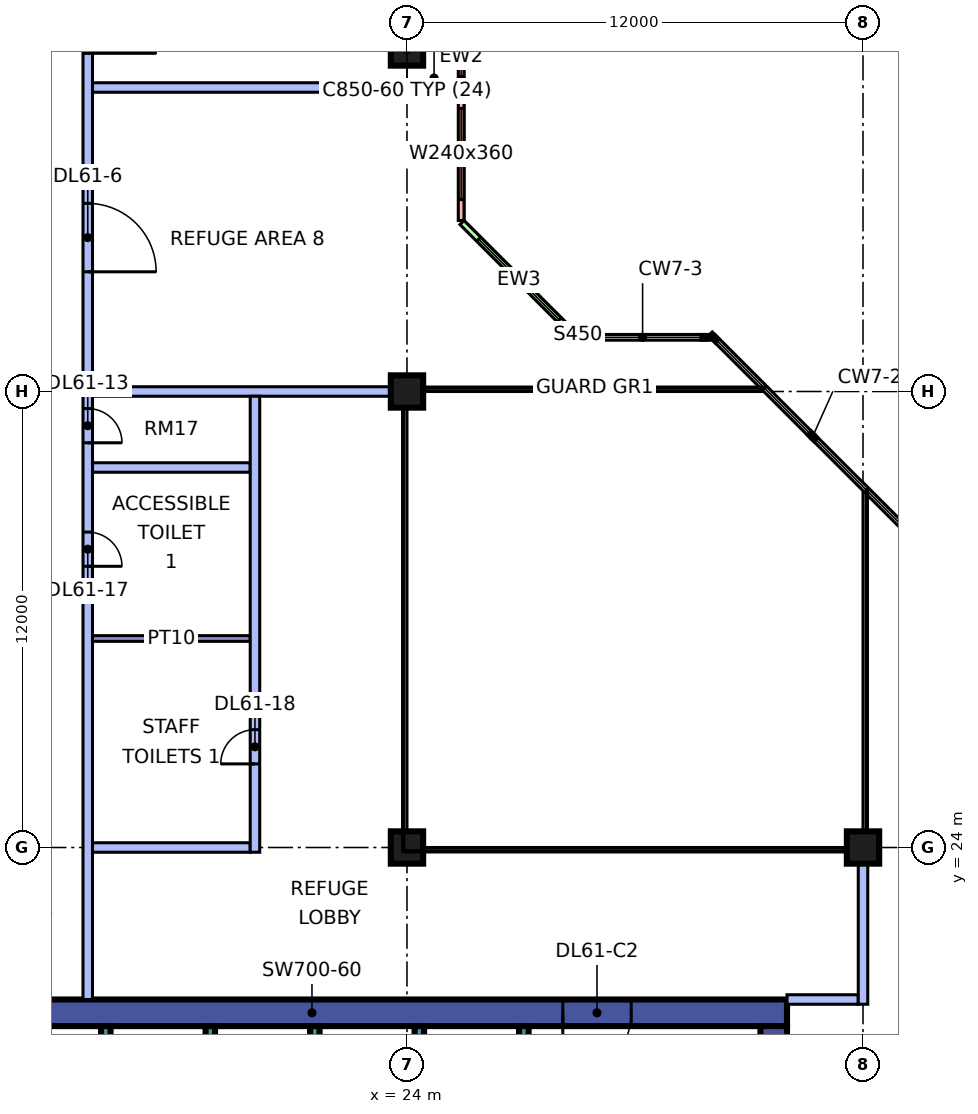
"""IFC4 building model, lengths in metres.
Left out: names, types, materials, properties, quantities, classifications, styles, units other than length and angle.
Written with IfcOpenShell. Run it as: python <this file> out.ifc"""

import sys

from ifc_helpers import new_model, si_unit, direction, frame, frame_2d, origin, origin_2d, place, context, subcontext, project, spatial, rectangle, extrude, element, fill, save


model = new_model("IFC4")
c1 = context("Model", 3, precision=1e-05, world=origin(), true_north=direction((0.0, 1.0)))
c2 = subcontext(c1, "Body", "Model", "MODEL_VIEW")
j1 = project(units=[si_unit("LENGTHUNIT", "METRE"), si_unit("PLANEANGLEUNIT", "RADIAN")], contexts=[c1])
p1 = place(None, origin())
s1 = spatial("IfcSite", under=j1, at=p1, CompositionType="ELEMENT")
p2 = place(p1, origin())
s2 = spatial("IfcBuilding", under=s1, at=p2, CompositionType="ELEMENT")
p3 = place(p2, frame((0.0, 0.0, 256.65)))
s3 = spatial("IfcBuildingStorey", under=s2, at=p3, CompositionType="ELEMENT", Elevation=256.65)
for number, where, z_axis, x_axis in (
    (1, (24.0, 24.0, 0.0), (0.0, 0.0, 1.0), (1.0, 0.0, 0.0)),
    (2, (24.0, 36.0, 0.0), (0.0, 0.0, 1.0), (1.0, 0.0, 0.0)),
    (3, (24.0, 45.0, 0.0), (0.0, 0.0, 1.0), (1.0, 0.0, 0.0)),
    (4, (36.0, 24.0, 0.0), (0.0, 0.0, 1.0), (1.0, 0.0, 0.0)),
):
    element("IfcColumn", number, at=place(p3, frame(where, z_axis=z_axis, x_axis=x_axis)), inside=s3, PredefinedType="COLUMN", context=c2, shape_type="SweptSolid", body=[
        extrude(rectangle(XDim=0.85, YDim=0.85, at=origin_2d()), origin(), (0.0, 0.0, 1.0), 5.5),
    ])
p4 = place(p3, frame((9.0, 19.65, 0.0), z_axis=(0.0, 0.0, 1.0), x_axis=(1.0, 0.0, 0.0)))
e5 = element("IfcWall", 5, at=p4, inside=s3, PredefinedType="SHEAR", context=c2, shape_type="SweptSolid", body=[
    extrude(rectangle(XDim=25.0, YDim=0.7, at=frame_2d((12.5, 0.0))), origin(), (0.0, 0.0, 1.0), 5.5),
])
p5 = place(p4, frame((19.1, 0.0, 0.0)))
e6 = element("IfcOpeningElement", 6, at=p5, cuts=e5, PredefinedType="OPENING", context=c2, shape_type="SweptSolid", body=[
    extrude(rectangle(XDim=1.8, YDim=2.4, at=frame_2d((0.9, 1.2))), frame((0.0, 0.36, 0.0), z_axis=(0.0, -1.0, 0.0), x_axis=(1.0, 0.0, 0.0)), (0.0, 0.0, 1.0), 0.72),
])
p6 = place(p3, frame((33.65, 7.7, 0.0), z_axis=(0.0, 0.0, 1.0), x_axis=(0.0, 1.0, 0.0)))
e7 = element("IfcWall", 7, at=p6, inside=s3, PredefinedType="SHEAR", context=c2, shape_type="SweptSolid", body=[
    extrude(rectangle(XDim=11.6, YDim=0.7, at=frame_2d((5.8, 0.0))), origin(), (0.0, 0.0, 1.0), 5.5),
])
p7 = place(p6, frame((5.5, 0.0, 0.0)))
e8 = element("IfcOpeningElement", 8, at=p7, cuts=e7, PredefinedType="OPENING", context=c2, shape_type="SweptSolid", body=[
    extrude(rectangle(XDim=1.8, YDim=2.4, at=frame_2d((0.9, 1.2))), frame((0.0, 0.36, 0.0), z_axis=(0.0, -1.0, 0.0), x_axis=(1.0, 0.0, 0.0)), (0.0, 0.0, 1.0), 0.72),
])
for number, where, z_axis, x_axis in (
    (9, (16.075, 15.8, 0.0), (0.0, 0.0, 1.0), (0.0, 1.0, 0.0)),
    (10, (18.825, 15.8, 0.0), (0.0, 0.0, 1.0), (0.0, 1.0, 0.0)),
    (11, (21.575, 15.8, 0.0), (0.0, 0.0, 1.0), (0.0, 1.0, 0.0)),
    (12, (24.325, 15.8, 0.0), (0.0, 0.0, 1.0), (0.0, 1.0, 0.0)),
    (13, (27.075, 15.8, 0.0), (0.0, 0.0, 1.0), (0.0, 1.0, 0.0)),
):
    element("IfcWall", number, at=place(p3, frame(where, z_axis=z_axis, x_axis=x_axis)), inside=s3, PredefinedType="SHEAR", context=c2, shape_type="SweptSolid", body=[
        extrude(rectangle(XDim=3.5, YDim=0.25, at=frame_2d((1.75, 0.0))), origin(), (0.0, 0.0, 1.0), 5.5),
    ])
p8 = place(p3, frame((28.447, 37.447, 0.0), z_axis=(0.0, 0.0, 1.0), x_axis=(-0.707106781187, 0.707106781187, 0.0)))
e14 = element("IfcWall", 14, at=p8, inside=s3, PredefinedType="SOLIDWALL", context=c2, shape_type="SweptSolid", body=[
    extrude(rectangle(XDim=4.243, YDim=0.15, at=frame_2d((2.121, 0.0))), origin(), (0.0, 0.0, 1.0), 5.05),
])
p9 = place(p8, frame((0.621, 0.0, 0.45)))
e15 = element("IfcOpeningElement", 15, at=p9, cuts=e14, PredefinedType="OPENING", context=c2, shape_type="SweptSolid", body=[
    extrude(rectangle(XDim=3.0, YDim=3.6, at=frame_2d((1.5, 1.8))), frame((0.0, 0.085, 0.0), z_axis=(0.0, -1.0, 0.0), x_axis=(1.0, 0.0, 0.0)), (0.0, 0.0, 1.0), 0.17),
])
p10 = place(p3, frame((25.425, 40.5, 0.0), z_axis=(0.0, 0.0, 1.0), x_axis=(0.0, 1.0, 0.0)))
e16 = element("IfcWall", 16, at=p10, inside=s3, PredefinedType="SOLIDWALL", context=c2, shape_type="SweptSolid", body=[
    extrude(rectangle(XDim=7.425, YDim=0.15, at=frame_2d((3.712, 0.0))), origin(), (0.0, 0.0, 1.0), 5.05),
])
p11 = place(p10, frame((0.55, 0.0, 0.45)))
e17 = element("IfcOpeningElement", 17, at=p11, cuts=e16, PredefinedType="OPENING", context=c2, shape_type="SweptSolid", body=[
    extrude(rectangle(XDim=2.4, YDim=3.6, at=frame_2d((1.2, 1.8))), frame((0.0, 0.085, 0.0), z_axis=(0.0, -1.0, 0.0), x_axis=(1.0, 0.0, 0.0)), (0.0, 0.0, 1.0), 0.17),
])
p12 = place(p3, frame((15.6, 20.0, 0.0), z_axis=(0.0, 0.0, 1.0), x_axis=(0.0, 1.0, 0.0)))
e18 = element("IfcWall", 18, at=p12, inside=s3, PredefinedType="PARTITIONING", context=c2, shape_type="SweptSolid", body=[
    extrude(rectangle(XDim=27.775, YDim=0.25, at=frame_2d((13.887, 0.0))), origin(), (0.0, 0.0, 1.0), 5.05),
])
p13 = place(p12, frame((19.15, 0.0, 0.0)))
e19 = element("IfcOpeningElement", 19, at=p13, cuts=e18, PredefinedType="OPENING", context=c2, shape_type="SweptSolid", body=[
    extrude(rectangle(XDim=1.8, YDim=2.1, at=frame_2d((0.9, 1.05))), frame((0.0, 0.135, 0.0), z_axis=(0.0, -1.0, 0.0), x_axis=(1.0, 0.0, 0.0)), (0.0, 0.0, 1.0), 0.27),
])
p14 = place(p12, frame((24.9, 0.0, 0.0)))
e20 = element("IfcOpeningElement", 20, at=p14, cuts=e18, PredefinedType="OPENING", context=c2, shape_type="SweptSolid", body=[
    extrude(rectangle(XDim=1.8, YDim=2.1, at=frame_2d((0.9, 1.05))), frame((0.0, 0.135, 0.0), z_axis=(0.0, -1.0, 0.0), x_axis=(1.0, 0.0, 0.0)), (0.0, 0.0, 1.0), 0.27),
])
p15 = place(p12, frame((14.65, 0.0, 0.0)))
e21 = element("IfcOpeningElement", 21, at=p15, cuts=e18, PredefinedType="OPENING", context=c2, shape_type="SweptSolid", body=[
    extrude(rectangle(XDim=0.9, YDim=2.1, at=frame_2d((0.45, 1.05))), frame((0.0, 0.135, 0.0), z_axis=(0.0, -1.0, 0.0), x_axis=(1.0, 0.0, 0.0)), (0.0, 0.0, 1.0), 0.27),
])
p16 = place(p12, frame((11.4, 0.0, 0.0)))
e22 = element("IfcOpeningElement", 22, at=p16, cuts=e18, PredefinedType="OPENING", context=c2, shape_type="SweptSolid", body=[
    extrude(rectangle(XDim=0.9, YDim=2.1, at=frame_2d((0.45, 1.05))), frame((0.0, 0.135, 0.0), z_axis=(0.0, -1.0, 0.0), x_axis=(1.0, 0.0, 0.0)), (0.0, 0.0, 1.0), 0.27),
])
p17 = place(p3, frame((15.725, 24.0, 0.0), z_axis=(0.0, 0.0, 1.0), x_axis=(1.0, 0.0, 0.0)))
e23 = element("IfcWall", 23, at=p17, inside=s3, PredefinedType="PARTITIONING", context=c2, shape_type="SweptSolid", body=[
    extrude(rectangle(XDim=4.15, YDim=0.25, at=frame_2d((2.075, 0.0))), origin(), (0.0, 0.0, 1.0), 5.05),
])
p18 = place(p3, frame((15.725, 29.5, 0.0), z_axis=(0.0, 0.0, 1.0), x_axis=(1.0, 0.0, 0.0)))
e24 = element("IfcWall", 24, at=p18, inside=s3, PredefinedType="PARTITIONING", context=c2, shape_type="SweptSolid", body=[
    extrude(rectangle(XDim=4.15, YDim=0.15, at=frame_2d((2.075, 0.0))), origin(), (0.0, 0.0, 1.0), 5.05),
])
p19 = place(p3, frame((15.725, 34.0, 0.0), z_axis=(0.0, 0.0, 1.0), x_axis=(1.0, 0.0, 0.0)))
e25 = element("IfcWall", 25, at=p19, inside=s3, PredefinedType="PARTITIONING", context=c2, shape_type="SweptSolid", body=[
    extrude(rectangle(XDim=4.15, YDim=0.25, at=frame_2d((2.075, 0.0))), origin(), (0.0, 0.0, 1.0), 5.05),
])
p20 = place(p3, frame((15.725, 36.0, 0.0), z_axis=(0.0, 0.0, 1.0), x_axis=(1.0, 0.0, 0.0)))
e26 = element("IfcWall", 26, at=p20, inside=s3, PredefinedType="PARTITIONING", context=c2, shape_type="SweptSolid", body=[
    extrude(rectangle(XDim=8.275, YDim=0.25, at=frame_2d((4.137, 0.0))), origin(), (0.0, 0.0, 1.0), 5.05),
])
p21 = place(p3, frame((15.725, 44.0, 0.0), z_axis=(0.0, 0.0, 1.0), x_axis=(1.0, 0.0, 0.0)))
e27 = element("IfcWall", 27, at=p21, inside=s3, PredefinedType="PARTITIONING", context=c2, shape_type="SweptSolid", body=[
    extrude(rectangle(XDim=9.625, YDim=0.25, at=frame_2d((4.812, 0.0))), origin(), (0.0, 0.0, 1.0), 5.05),
])
p22 = place(p3, frame((20.0, 23.875, 0.0), z_axis=(0.0, 0.0, 1.0), x_axis=(0.0, 1.0, 0.0)))
e28 = element("IfcWall", 28, at=p22, inside=s3, PredefinedType="PARTITIONING", context=c2, shape_type="SweptSolid", body=[
    extrude(rectangle(XDim=12.0, YDim=0.25, at=frame_2d((6.0, 0.0))), origin(), (0.0, 0.0, 1.0), 5.05),
])
p23 = place(p22, frame((2.325, 0.0, 0.0)))
e29 = element("IfcOpeningElement", 29, at=p23, cuts=e28, PredefinedType="OPENING", context=c2, shape_type="SweptSolid", body=[
    extrude(rectangle(XDim=0.9, YDim=2.1, at=frame_2d((0.45, 1.05))), frame((0.0, 0.135, 0.0), z_axis=(0.0, -1.0, 0.0), x_axis=(1.0, 0.0, 0.0)), (0.0, 0.0, 1.0), 0.27),
])
p24 = place(p3, frame((34.0, 20.0, 0.0), z_axis=(0.0, 0.0, 1.0), x_axis=(1.0, 0.0, 0.0)))
e30 = element("IfcWall", 30, at=p24, inside=s3, PredefinedType="PARTITIONING", context=c2, shape_type="SweptSolid", body=[
    extrude(rectangle(XDim=1.875, YDim=0.25, at=frame_2d((0.938, 0.0))), origin(), (0.0, 0.0, 1.0), 5.05),
])
p25 = place(p3, frame((36.0, 19.875, 0.0), z_axis=(0.0, 0.0, 1.0), x_axis=(0.0, 1.0, 0.0)))
e31 = element("IfcWall", 31, at=p25, inside=s3, PredefinedType="PARTITIONING", context=c2, shape_type="SweptSolid", body=[
    extrude(rectangle(XDim=4.125, YDim=0.25, at=frame_2d((2.062, 0.0))), origin(), (0.0, 0.0, 1.0), 5.05),
])
p26 = place(p9, origin())
e32 = element("IfcWindow", 32, at=p26, inside=s3, PartitioningType="SINGLE_PANEL", PredefinedType="WINDOW", context=c2, shape_type="SweptSolid", body=[
    extrude(rectangle(XDim=3.0, YDim=3.6, at=frame_2d((1.5, 1.8))), frame((0.0, 0.03, 0.0), z_axis=(0.0, -1.0, 0.0), x_axis=(1.0, 0.0, 0.0)), (0.0, 0.0, 1.0), 0.06),
])
fill(e15, e32)
p27 = place(p11, origin())
e33 = element("IfcWindow", 33, at=p27, inside=s3, PartitioningType="SINGLE_PANEL", PredefinedType="WINDOW", context=c2, shape_type="SweptSolid", body=[
    extrude(rectangle(XDim=2.4, YDim=3.6, at=frame_2d((1.2, 1.8))), frame((0.0, 0.03, 0.0), z_axis=(0.0, -1.0, 0.0), x_axis=(1.0, 0.0, 0.0)), (0.0, 0.0, 1.0), 0.06),
])
fill(e17, e33)
p28 = place(p5, frame((1.8, 0.0, 0.0), z_axis=(0.0, 0.0, 1.0), x_axis=(-1.0, 0.0, 0.0)))
e34 = element("IfcDoor", 34, at=p28, inside=s3, OperationType="DOUBLE_DOOR_SINGLE_SWING", PredefinedType="DOOR", context=c2, shape_type="SweptSolid", body=[
    extrude(rectangle(XDim=1.8, YDim=2.4, at=frame_2d((0.9, 1.2))), frame((0.0, 0.025, 0.0), z_axis=(0.0, -1.0, 0.0), x_axis=(1.0, 0.0, 0.0)), (0.0, 0.0, 1.0), 0.05),
])
fill(e6, e34)
p29 = place(p13, frame((1.8, 0.0, 0.0), z_axis=(0.0, 0.0, 1.0), x_axis=(-1.0, 0.0, 0.0)))
e35 = element("IfcDoor", 35, at=p29, inside=s3, OperationType="DOUBLE_DOOR_SINGLE_SWING", PredefinedType="DOOR", context=c2, shape_type="SweptSolid", body=[
    extrude(rectangle(XDim=1.8, YDim=2.1, at=frame_2d((0.9, 1.05))), frame((0.0, 0.025, 0.0), z_axis=(0.0, -1.0, 0.0), x_axis=(1.0, 0.0, 0.0)), (0.0, 0.0, 1.0), 0.05),
])
fill(e19, e35)
p30 = place(p14, frame((1.8, 0.0, 0.0), z_axis=(0.0, 0.0, 1.0), x_axis=(-1.0, 0.0, 0.0)))
e36 = element("IfcDoor", 36, at=p30, inside=s3, OperationType="DOUBLE_DOOR_SINGLE_SWING", PredefinedType="DOOR", context=c2, shape_type="SweptSolid", body=[
    extrude(rectangle(XDim=1.8, YDim=2.1, at=frame_2d((0.9, 1.05))), frame((0.0, 0.025, 0.0), z_axis=(0.0, -1.0, 0.0), x_axis=(1.0, 0.0, 0.0)), (0.0, 0.0, 1.0), 0.05),
])
fill(e20, e36)
p31 = place(p15, frame((0.9, 0.0, 0.0), z_axis=(0.0, 0.0, 1.0), x_axis=(-1.0, 0.0, 0.0)))
e37 = element("IfcDoor", 37, at=p31, inside=s3, OperationType="SINGLE_SWING_LEFT", PredefinedType="DOOR", context=c2, shape_type="SweptSolid", body=[
    extrude(rectangle(XDim=0.9, YDim=2.1, at=frame_2d((0.45, 1.05))), frame((0.0, 0.025, 0.0), z_axis=(0.0, -1.0, 0.0), x_axis=(1.0, 0.0, 0.0)), (0.0, 0.0, 1.0), 0.05),
])
fill(e21, e37)
p32 = place(p16, frame((0.9, 0.0, 0.0), z_axis=(0.0, 0.0, 1.0), x_axis=(-1.0, 0.0, 0.0)))
e38 = element("IfcDoor", 38, at=p32, inside=s3, OperationType="SINGLE_SWING_LEFT", PredefinedType="DOOR", context=c2, shape_type="SweptSolid", body=[
    extrude(rectangle(XDim=0.9, YDim=2.1, at=frame_2d((0.45, 1.05))), frame((0.0, 0.025, 0.0), z_axis=(0.0, -1.0, 0.0), x_axis=(1.0, 0.0, 0.0)), (0.0, 0.0, 1.0), 0.05),
])
fill(e22, e38)
p33 = place(p23, origin())
e39 = element("IfcDoor", 39, at=p33, inside=s3, OperationType="SINGLE_SWING_LEFT", PredefinedType="DOOR", context=c2, shape_type="SweptSolid", body=[
    extrude(rectangle(XDim=0.9, YDim=2.1, at=frame_2d((0.45, 1.05))), frame((0.0, 0.025, 0.0), z_axis=(0.0, -1.0, 0.0), x_axis=(1.0, 0.0, 0.0)), (0.0, 0.0, 1.0), 0.05),
])
fill(e29, e39)
save(model, sys.argv[1])
